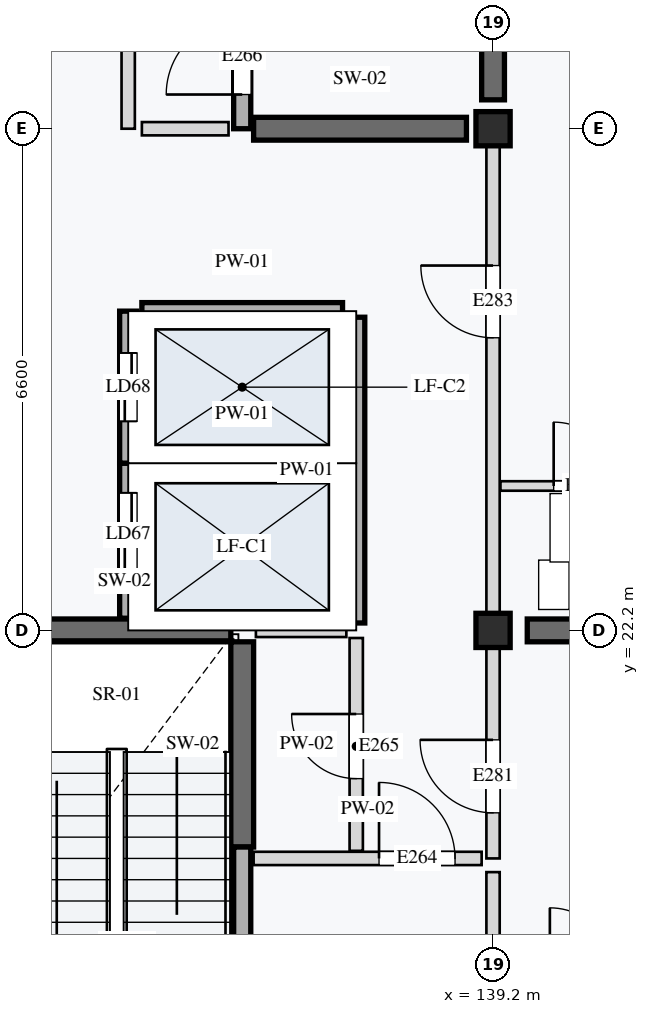
"""IFC4 building model, lengths in metres.
Left out: names, types, materials, properties, quantities, classifications, styles, units other than length and angle.
Written with IfcOpenShell. Run it as: python <this file> out.ifc"""

import sys

from ifc_helpers import new_model, si_unit, direction, frame, frame_2d, origin, origin_2d, place, context, subcontext, project, spatial, rectangle, extrude, element, fill, save


model = new_model("IFC4")
c1 = context("Model", 3, precision=1e-05, world=origin(), true_north=direction((0.0, 1.0)))
c2 = subcontext(c1, "Body", "Model", "MODEL_VIEW")
j1 = project(units=[si_unit("LENGTHUNIT", "METRE"), si_unit("PLANEANGLEUNIT", "RADIAN")], contexts=[c1])
p1 = place(None, origin())
s1 = spatial("IfcSite", under=j1, at=p1, CompositionType="ELEMENT")
p2 = place(p1, origin())
s2 = spatial("IfcBuilding", under=s1, at=p2, CompositionType="ELEMENT")
p3 = place(p2, frame((0.0, 0.0, 21.2)))
s3 = spatial("IfcBuildingStorey", under=s2, at=p3, CompositionType="ELEMENT", Elevation=21.2)
for number, where, z_axis, x_axis in (
    (1, (139.2, 22.2, 0.0), (0.0, 0.0, 1.0), (1.0, 0.0, 0.0)),
    (2, (139.2, 28.8, 0.0), (0.0, 0.0, 1.0), (1.0, 0.0, 0.0)),
):
    element("IfcColumn", number, at=place(p3, frame(where, z_axis=z_axis, x_axis=x_axis)), inside=s3, PredefinedType="COLUMN", context=c2, shape_type="SweptSolid", body=[
        extrude(rectangle(XDim=0.45, YDim=0.45, at=origin_2d()), origin(), (0.0, 0.0, 1.0), 3.2),
    ])
p4 = place(p3, frame((135.9, 19.35, 0.0), z_axis=(0.0, 0.0, 1.0), x_axis=(0.0, 1.0, 0.0)))
e3 = element("IfcWall", 3, at=p4, inside=s3, PredefinedType="SHEAR", context=c2, shape_type="SweptSolid", body=[
    extrude(rectangle(XDim=2.7, YDim=0.3, at=frame_2d((1.35, 0.0))), origin(), (0.0, 0.0, 1.0), 2.96),
])
p5 = place(p3, frame((132.95, 22.2, 0.0), z_axis=(0.0, 0.0, 1.0), x_axis=(1.0, 0.0, 0.0)))
e4 = element("IfcWall", 4, at=p5, inside=s3, PredefinedType="SHEAR", context=c2, shape_type="SweptSolid", body=[
    extrude(rectangle(XDim=2.8, YDim=0.3, at=frame_2d((1.4, 0.0))), origin(), (0.0, 0.0, 1.0), 2.96),
])
p6 = place(p3, frame((139.2, 29.18, 0.0), z_axis=(0.0, 0.0, 1.0), x_axis=(0.0, 1.0, 0.0)))
e5 = element("IfcWall", 5, at=p6, inside=s3, PredefinedType="SHEAR", context=c2, shape_type="SweptSolid", body=[
    extrude(rectangle(XDim=5.84, YDim=0.3, at=frame_2d((2.92, 0.0))), origin(), (0.0, 0.0, 1.0), 2.96),
])
p7 = place(p3, frame((136.05, 28.8, 0.0), z_axis=(0.0, 0.0, 1.0), x_axis=(1.0, 0.0, 0.0)))
e6 = element("IfcWall", 6, at=p7, inside=s3, PredefinedType="SHEAR", context=c2, shape_type="SweptSolid", body=[
    extrude(rectangle(XDim=2.8, YDim=0.3, at=frame_2d((1.4, 0.0))), origin(), (0.0, 0.0, 1.0), 2.96),
])
p8 = place(p3, frame((139.65, 22.2, 0.0), z_axis=(0.0, 0.0, 1.0), x_axis=(1.0, 0.0, 0.0)))
e7 = element("IfcWall", 7, at=p8, inside=s3, PredefinedType="SHEAR", context=c2, shape_type="SweptSolid", body=[
    extrude(rectangle(XDim=5.7, YDim=0.3, at=frame_2d((2.85, 0.0))), origin(), (0.0, 0.0, 1.0), 2.96),
])
p9 = place(p3, frame((135.9, 15.75, 0.0), z_axis=(0.0, 0.0, 1.0), x_axis=(0.0, 1.0, 0.0)))
e8 = element("IfcWall", 8, at=p9, inside=s3, PredefinedType="STANDARD", context=c2, shape_type="SweptSolid", body=[
    extrude(rectangle(XDim=3.6, YDim=0.225, at=frame_2d((1.8, 0.0))), origin(), (0.0, 0.0, 1.0), 2.96),
])
p10 = place(p9, frame((0.45, 0.0, 0.0)))
e9 = element("IfcOpeningElement", 9, at=p10, cuts=e8, PredefinedType="OPENING", context=c2, shape_type="SweptSolid", body=[
    extrude(rectangle(XDim=1.04, YDim=2.12, at=frame_2d((0.52, 1.06))), frame((0.0, 0.123, 0.0), z_axis=(0.0, -1.0, 0.0), x_axis=(1.0, 0.0, 0.0)), (0.0, 0.0, 1.0), 0.245),
])
p11 = place(p3, frame((136.05, 19.2, 0.0), z_axis=(0.0, 0.0, 1.0), x_axis=(1.0, 0.0, 0.0)))
e10 = element("IfcWall", 10, at=p11, inside=s3, PredefinedType="PARTITIONING", context=c2, shape_type="SweptSolid", body=[
    extrude(rectangle(XDim=3.0, YDim=0.175, at=frame_2d((1.5, 0.0))), origin(), (0.0, 0.0, 1.0), 2.96),
])
p12 = place(p11, frame((1.65, 0.0, 0.0)))
e11 = element("IfcOpeningElement", 11, at=p12, cuts=e10, PredefinedType="OPENING", context=c2, shape_type="SweptSolid", body=[
    extrude(rectangle(XDim=1.0, YDim=2.1, at=frame_2d((0.5, 1.05))), frame((0.0, 0.097, 0.0), z_axis=(0.0, -1.0, 0.0), x_axis=(1.0, 0.0, 0.0)), (0.0, 0.0, 1.0), 0.195),
])
p13 = place(p3, frame((137.4, 19.3, 0.0), z_axis=(0.0, 0.0, 1.0), x_axis=(0.0, 1.0, 0.0)))
e12 = element("IfcWall", 12, at=p13, inside=s3, PredefinedType="PARTITIONING", context=c2, shape_type="SweptSolid", body=[
    extrude(rectangle(XDim=2.8, YDim=0.175, at=frame_2d((1.4, 0.0))), origin(), (0.0, 0.0, 1.0), 2.96),
])
p14 = place(p13, frame((0.95, 0.0, 0.0)))
e13 = element("IfcOpeningElement", 13, at=p14, cuts=e12, PredefinedType="OPENING", context=c2, shape_type="SweptSolid", body=[
    extrude(rectangle(XDim=0.85, YDim=2.0, at=frame_2d((0.425, 1.0))), frame((0.0, 0.097, 0.0), z_axis=(0.0, -1.0, 0.0), x_axis=(1.0, 0.0, 0.0)), (0.0, 0.0, 1.0), 0.195),
])
p15 = place(p3, frame((136.08, 22.2, 0.0), z_axis=(0.0, 0.0, 1.0), x_axis=(1.0, 0.0, 0.0)))
e14 = element("IfcWall", 14, at=p15, inside=s3, PredefinedType="PARTITIONING", context=c2, shape_type="SweptSolid", body=[
    extrude(rectangle(XDim=1.19, YDim=0.175, at=frame_2d((0.595, 0.0))), origin(), (0.0, 0.0, 1.0), 2.96),
])
p16 = place(p3, frame((134.4, 22.36, 0.0), z_axis=(0.0, 0.0, 1.0), x_axis=(0.0, 1.0, 0.0)))
e15 = element("IfcWall", 15, at=p16, inside=s3, PredefinedType="STANDARD", context=c2, shape_type="SweptSolid", body=[
    extrude(rectangle(XDim=2.04, YDim=0.225, at=frame_2d((1.02, 0.0))), origin(), (0.0, 0.0, 1.0), 2.96),
])
p17 = place(p16, frame((0.55, 0.0, 0.0)))
e16 = element("IfcOpeningElement", 16, at=p17, cuts=e15, PredefinedType="OPENING", context=c2, shape_type="SweptSolid", body=[
    extrude(rectangle(XDim=1.1, YDim=2.1, at=frame_2d((0.55, 1.05))), frame((0.0, 0.123, 0.0), z_axis=(0.0, -1.0, 0.0), x_axis=(1.0, 0.0, 0.0)), (0.0, 0.0, 1.0), 0.245),
])
p18 = place(p3, frame((134.4, 24.4, 0.0), z_axis=(0.0, 0.0, 1.0), x_axis=(0.0, 1.0, 0.0)))
e17 = element("IfcWall", 17, at=p18, inside=s3, PredefinedType="STANDARD", context=c2, shape_type="SweptSolid", body=[
    extrude(rectangle(XDim=2.0, YDim=0.225, at=frame_2d((1.0, 0.0))), origin(), (0.0, 0.0, 1.0), 2.96),
])
p19 = place(p18, frame((0.55, 0.0, 0.0)))
e18 = element("IfcOpeningElement", 18, at=p19, cuts=e17, PredefinedType="OPENING", context=c2, shape_type="SweptSolid", body=[
    extrude(rectangle(XDim=0.9, YDim=2.1, at=frame_2d((0.45, 1.05))), frame((0.0, 0.123, 0.0), z_axis=(0.0, -1.0, 0.0), x_axis=(1.0, 0.0, 0.0)), (0.0, 0.0, 1.0), 0.245),
])
p20 = place(p3, frame((137.4, 22.298, 0.0), z_axis=(0.0, 0.0, 1.0), x_axis=(0.0, 1.0, 0.0)))
e19 = element("IfcWall", 19, at=p20, inside=s3, PredefinedType="STANDARD", context=c2, shape_type="SweptSolid", body=[
    extrude(rectangle(XDim=4.022, YDim=0.225, at=frame_2d((2.011, 0.0))), origin(), (0.0, 0.0, 1.0), 2.96),
])
for number, where, z_axis, x_axis in (
    (20, (134.58, 24.4, 0.0), (0.0, 0.0, 1.0), (1.0, 0.0, 0.0)),
    (21, (134.58, 26.4, 0.0), (0.0, 0.0, 1.0), (1.0, 0.0, 0.0)),
):
    element("IfcWall", number, at=place(p3, frame(where, z_axis=z_axis, x_axis=x_axis)), inside=s3, PredefinedType="STANDARD", context=c2, shape_type="SweptSolid", body=[
        extrude(rectangle(XDim=2.64, YDim=0.225, at=frame_2d((1.32, 0.0))), origin(), (0.0, 0.0, 1.0), 2.96),
    ])
p21 = place(p3, frame((135.9, 28.8, 0.0), z_axis=(0.0, 0.0, 1.0), x_axis=(0.0, 1.0, 0.0)))
e22 = element("IfcWall", 22, at=p21, inside=s3, PredefinedType="STANDARD", context=c2, shape_type="SweptSolid", body=[
    extrude(rectangle(XDim=3.45, YDim=0.225, at=frame_2d((1.725, 0.0))), origin(), (0.0, 0.0, 1.0), 2.96),
])
p22 = place(p21, frame((0.45, 0.0, 0.0)))
e23 = element("IfcOpeningElement", 23, at=p22, cuts=e22, PredefinedType="OPENING", context=c2, shape_type="SweptSolid", body=[
    extrude(rectangle(XDim=1.0, YDim=2.16, at=frame_2d((0.5, 1.08))), frame((0.0, 0.123, 0.0), z_axis=(0.0, -1.0, 0.0), x_axis=(1.0, 0.0, 0.0)), (0.0, 0.0, 1.0), 0.245),
])
p23 = place(p3, frame((134.4, 28.8, 0.0), z_axis=(0.0, 0.0, 1.0), x_axis=(0.0, 1.0, 0.0)))
e24 = element("IfcWall", 24, at=p23, inside=s3, PredefinedType="PARTITIONING", context=c2, shape_type="SweptSolid", body=[
    extrude(rectangle(XDim=3.3, YDim=0.175, at=frame_2d((1.65, 0.0))), origin(), (0.0, 0.0, 1.0), 2.96),
])
p24 = place(p23, frame((1.8, 0.0, 0.0)))
e25 = element("IfcOpeningElement", 25, at=p24, cuts=e24, PredefinedType="OPENING", context=c2, shape_type="SweptSolid", body=[
    extrude(rectangle(XDim=1.04, YDim=2.12, at=frame_2d((0.52, 1.06))), frame((0.0, 0.097, 0.0), z_axis=(0.0, -1.0, 0.0), x_axis=(1.0, 0.0, 0.0)), (0.0, 0.0, 1.0), 0.195),
])
p25 = place(p3, frame((134.58, 28.8, 0.0), z_axis=(0.0, 0.0, 1.0), x_axis=(1.0, 0.0, 0.0)))
e26 = element("IfcWall", 26, at=p25, inside=s3, PredefinedType="PARTITIONING", context=c2, shape_type="SweptSolid", body=[
    extrude(rectangle(XDim=1.14, YDim=0.175, at=frame_2d((0.57, 0.0))), origin(), (0.0, 0.0, 1.0), 2.96),
])
p26 = place(p3, frame((139.2, 15.88, 0.0), z_axis=(0.0, 0.0, 1.0), x_axis=(0.0, 1.0, 0.0)))
e27 = element("IfcWall", 27, at=p26, inside=s3, PredefinedType="PARTITIONING", context=c2, shape_type="SweptSolid", body=[
    extrude(rectangle(XDim=3.14, YDim=0.175, at=frame_2d((1.57, 0.0))), origin(), (0.0, 0.0, 1.0), 2.55),
])
p27 = place(p3, frame((139.2, 19.2, 0.0), z_axis=(0.0, 0.0, 1.0), x_axis=(0.0, 1.0, 0.0)))
e28 = element("IfcWall", 28, at=p27, inside=s3, PredefinedType="PARTITIONING", context=c2, shape_type="SweptSolid", body=[
    extrude(rectangle(XDim=3.0, YDim=0.175, at=frame_2d((1.5, 0.0))), origin(), (0.0, 0.0, 1.0), 2.55),
])
p28 = place(p27, frame((0.6, 0.0, 0.0)))
e29 = element("IfcOpeningElement", 29, at=p28, cuts=e28, PredefinedType="OPENING", context=c2, shape_type="SweptSolid", body=[
    extrude(rectangle(XDim=0.96, YDim=2.18, at=frame_2d((0.48, 1.09))), frame((0.0, 0.097, 0.0), z_axis=(0.0, -1.0, 0.0), x_axis=(1.0, 0.0, 0.0)), (0.0, 0.0, 1.0), 0.195),
])
p29 = place(p3, frame((139.2, 22.2, 0.0), z_axis=(0.0, 0.0, 1.0), x_axis=(0.0, 1.0, 0.0)))
e30 = element("IfcWall", 30, at=p29, inside=s3, PredefinedType="PARTITIONING", context=c2, shape_type="SweptSolid", body=[
    extrude(rectangle(XDim=6.6, YDim=0.175, at=frame_2d((3.3, 0.0))), origin(), (0.0, 0.0, 1.0), 2.55),
])
p30 = place(p29, frame((3.85, 0.0, 0.0)))
e31 = element("IfcOpeningElement", 31, at=p30, cuts=e30, PredefinedType="OPENING", context=c2, shape_type="SweptSolid", body=[
    extrude(rectangle(XDim=0.95, YDim=2.16, at=frame_2d((0.475, 1.08))), frame((0.0, 0.097, 0.0), z_axis=(0.0, -1.0, 0.0), x_axis=(1.0, 0.0, 0.0)), (0.0, 0.0, 1.0), 0.195),
])
p31 = place(p3, frame((139.298, 24.1, 0.0), z_axis=(0.0, 0.0, 1.0), x_axis=(1.0, 0.0, 0.0)))
e32 = element("IfcWall", 32, at=p31, inside=s3, PredefinedType="PARTITIONING", context=c2, shape_type="SweptSolid", body=[
    extrude(rectangle(XDim=2.302, YDim=0.125, at=frame_2d((1.151, 0.0))), origin(), (0.0, 0.0, 1.0), 2.96),
])
p32 = place(p31, frame((0.7, 0.0, 0.0)))
e33 = element("IfcOpeningElement", 33, at=p32, cuts=e32, PredefinedType="OPENING", context=c2, shape_type="SweptSolid", body=[
    extrude(rectangle(XDim=0.84, YDim=2.06, at=frame_2d((0.42, 1.03))), frame((0.0, 0.073, 0.0), z_axis=(0.0, -1.0, 0.0), x_axis=(1.0, 0.0, 0.0)), (0.0, 0.0, 1.0), 0.145),
])
p33 = place(p12, origin())
e34 = element("IfcDoor", 34, at=p33, inside=s3, OperationType="SINGLE_SWING_LEFT", PredefinedType="DOOR", context=c2, shape_type="SweptSolid", body=[
    extrude(rectangle(XDim=1.0, YDim=2.1, at=frame_2d((0.5, 1.05))), frame((0.0, 0.025, 0.0), z_axis=(0.0, -1.0, 0.0), x_axis=(1.0, 0.0, 0.0)), (0.0, 0.0, 1.0), 0.05),
])
fill(e11, e34)
p34 = place(p14, origin())
e35 = element("IfcDoor", 35, at=p34, inside=s3, OperationType="SINGLE_SWING_RIGHT", PredefinedType="DOOR", context=c2, shape_type="SweptSolid", body=[
    extrude(rectangle(XDim=0.85, YDim=2.0, at=frame_2d((0.425, 1.0))), frame((0.0, 0.025, 0.0), z_axis=(0.0, -1.0, 0.0), x_axis=(1.0, 0.0, 0.0)), (0.0, 0.0, 1.0), 0.05),
])
fill(e13, e35)
p35 = place(p17, origin())
e36 = element("IfcDoor", 36, at=p35, inside=s3, OperationType="DOUBLE_DOOR_SLIDING", PredefinedType="DOOR", context=c2, shape_type="SweptSolid", body=[
    extrude(rectangle(XDim=1.1, YDim=2.1, at=frame_2d((0.55, 1.05))), frame((0.0, 0.025, 0.0), z_axis=(0.0, -1.0, 0.0), x_axis=(1.0, 0.0, 0.0)), (0.0, 0.0, 1.0), 0.05),
])
fill(e16, e36)
p36 = place(p19, origin())
e37 = element("IfcDoor", 37, at=p36, inside=s3, OperationType="DOUBLE_DOOR_SLIDING", PredefinedType="DOOR", context=c2, shape_type="SweptSolid", body=[
    extrude(rectangle(XDim=0.9, YDim=2.1, at=frame_2d((0.45, 1.05))), frame((0.0, 0.025, 0.0), z_axis=(0.0, -1.0, 0.0), x_axis=(1.0, 0.0, 0.0)), (0.0, 0.0, 1.0), 0.05),
])
fill(e18, e37)
p37 = place(p22, origin())
e38 = element("IfcDoor", 38, at=p37, inside=s3, OperationType="SINGLE_SWING_LEFT", PredefinedType="DOOR", context=c2, shape_type="SweptSolid", body=[
    extrude(rectangle(XDim=1.0, YDim=2.16, at=frame_2d((0.5, 1.08))), frame((0.0, 0.025, 0.0), z_axis=(0.0, -1.0, 0.0), x_axis=(1.0, 0.0, 0.0)), (0.0, 0.0, 1.0), 0.05),
])
fill(e23, e38)
p38 = place(p28, origin())
e39 = element("IfcDoor", 39, at=p38, inside=s3, OperationType="SINGLE_SWING_RIGHT", PredefinedType="DOOR", context=c2, shape_type="SweptSolid", body=[
    extrude(rectangle(XDim=0.96, YDim=2.18, at=frame_2d((0.48, 1.09))), frame((0.0, 0.025, 0.0), z_axis=(0.0, -1.0, 0.0), x_axis=(1.0, 0.0, 0.0)), (0.0, 0.0, 1.0), 0.05),
])
fill(e29, e39)
p39 = place(p30, origin())
e40 = element("IfcDoor", 40, at=p39, inside=s3, OperationType="SINGLE_SWING_RIGHT", PredefinedType="DOOR", context=c2, shape_type="SweptSolid", body=[
    extrude(rectangle(XDim=0.95, YDim=2.16, at=frame_2d((0.475, 1.08))), frame((0.0, 0.025, 0.0), z_axis=(0.0, -1.0, 0.0), x_axis=(1.0, 0.0, 0.0)), (0.0, 0.0, 1.0), 0.05),
])
fill(e31, e40)
p40 = place(p32, origin())
e41 = element("IfcDoor", 41, at=p40, inside=s3, OperationType="SINGLE_SWING_LEFT", PredefinedType="DOOR", context=c2, shape_type="SweptSolid", body=[
    extrude(rectangle(XDim=0.84, YDim=2.06, at=frame_2d((0.42, 1.03))), frame((0.0, 0.025, 0.0), z_axis=(0.0, -1.0, 0.0), x_axis=(1.0, 0.0, 0.0)), (0.0, 0.0, 1.0), 0.05),
])
fill(e33, e41)
save(model, sys.argv[1])
